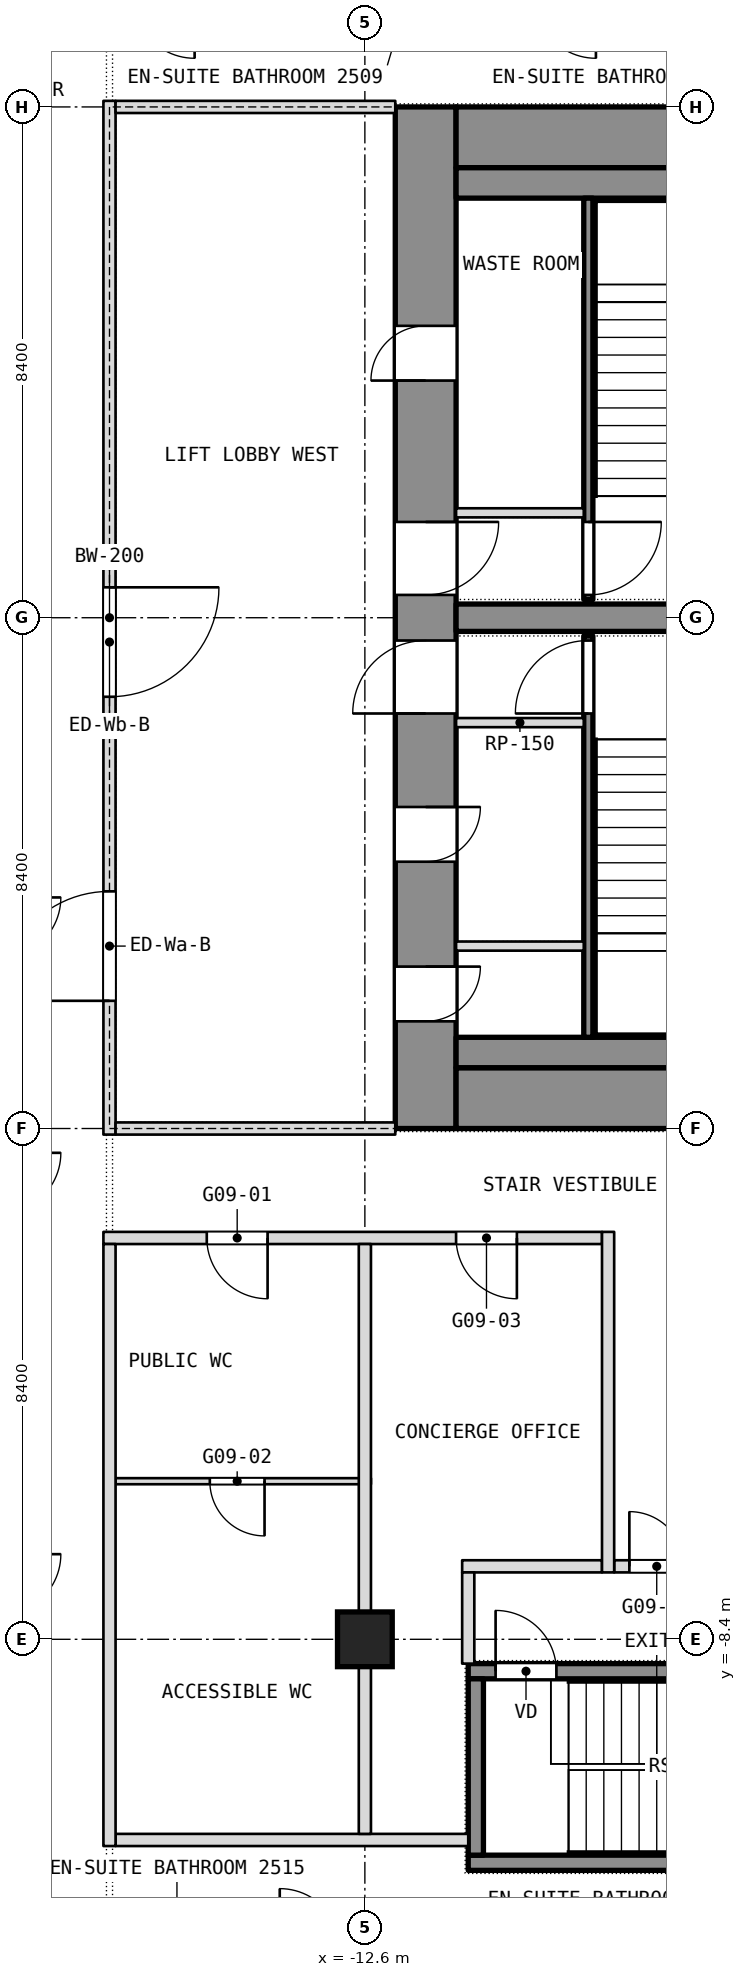
"""IFC4 building model, lengths in metres.
Left out: names, types, materials, properties, quantities, classifications, styles, units other than length and angle.
Written with IfcOpenShell. Run it as: python <this file> out.ifc"""

import sys

from ifc_helpers import new_model, si_unit, direction, frame, frame_2d, origin, origin_2d, place, context, subcontext, project, spatial, rectangle, extrude, element, fill, save


model = new_model("IFC4")
c1 = context("Model", 3, precision=1e-05, world=origin(), true_north=direction((0.0, 1.0)))
c2 = subcontext(c1, "Body", "Model", "MODEL_VIEW")
j1 = project(units=[si_unit("LENGTHUNIT", "METRE"), si_unit("PLANEANGLEUNIT", "RADIAN")], contexts=[c1])
p1 = place(None, origin())
s1 = spatial("IfcSite", under=j1, at=p1, CompositionType="ELEMENT")
p2 = place(p1, origin())
s2 = spatial("IfcBuilding", under=s1, at=p2, CompositionType="ELEMENT")
p3 = place(p2, frame((0.0, 0.0, 115.7)))
s3 = spatial("IfcBuildingStorey", under=s2, at=p3, CompositionType="ELEMENT", Elevation=115.7)
p4 = place(p3, frame((-11.6, 0.0, 0.0), z_axis=(0.0, 0.0, 1.0), x_axis=(0.0, 1.0, 0.0)))
e1 = element("IfcWall", 1, at=p4, inside=s3, PredefinedType="SHEAR", context=c2, shape_type="SweptSolid", body=[
    extrude(rectangle(XDim=16.8, YDim=1.0, at=frame_2d((8.4, 0.0))), origin(), (0.0, 0.0, 1.0), 3.6),
])
p5 = place(p4, frame((1.762, 0.0, 0.0)))
e2 = element("IfcOpeningElement", 2, at=p5, cuts=e1, PredefinedType="OPENING", context=c2, shape_type="SweptSolid", body=[
    extrude(rectangle(XDim=0.9, YDim=2.1, at=frame_2d((0.45, 1.05))), frame((0.0, 0.5, 0.0), z_axis=(0.0, -1.0, 0.0), x_axis=(1.0, 0.0, 0.0)), (0.0, 0.0, 1.0), 1.0),
])
p6 = place(p4, frame((4.387, 0.0, 0.0)))
e3 = element("IfcOpeningElement", 3, at=p6, cuts=e1, PredefinedType="OPENING", context=c2, shape_type="SweptSolid", body=[
    extrude(rectangle(XDim=0.9, YDim=2.1, at=frame_2d((0.45, 1.05))), frame((0.0, 0.5, 0.0), z_axis=(0.0, -1.0, 0.0), x_axis=(1.0, 0.0, 0.0)), (0.0, 0.0, 1.0), 1.0),
])
p7 = place(p4, frame((6.825, 0.0, 0.0)))
e4 = element("IfcOpeningElement", 4, at=p7, cuts=e1, PredefinedType="OPENING", context=c2, shape_type="SweptSolid", body=[
    extrude(rectangle(XDim=1.2, YDim=2.1, at=frame_2d((0.6, 1.05))), frame((0.0, 0.5, 0.0), z_axis=(0.0, -1.0, 0.0), x_axis=(1.0, 0.0, 0.0)), (0.0, 0.0, 1.0), 1.0),
])
p8 = place(p4, frame((12.3, 0.0, 0.0)))
e5 = element("IfcOpeningElement", 5, at=p8, cuts=e1, PredefinedType="OPENING", context=c2, shape_type="SweptSolid", body=[
    extrude(rectangle(XDim=0.9, YDim=2.1, at=frame_2d((0.45, 1.05))), frame((0.0, 0.5, 0.0), z_axis=(0.0, -1.0, 0.0), x_axis=(1.0, 0.0, 0.0)), (0.0, 0.0, 1.0), 1.0),
])
p9 = place(p4, frame((8.775, 0.0, 0.0)))
e6 = element("IfcOpeningElement", 6, at=p9, cuts=e1, PredefinedType="OPENING", context=c2, shape_type="SweptSolid", body=[
    extrude(rectangle(XDim=1.2, YDim=2.1, at=frame_2d((0.6, 1.05))), frame((0.0, 0.5, 0.0), z_axis=(0.0, -1.0, 0.0), x_axis=(1.0, 0.0, 0.0)), (0.0, 0.0, 1.0), 1.0),
])
for number, where, z_axis, x_axis in (
    (7, (-11.1, 0.5, 0.0), (0.0, 0.0, 1.0), (1.0, 0.0, 0.0)),
    (8, (-11.1, 16.3, 0.0), (0.0, 0.0, 1.0), (1.0, 0.0, 0.0)),
):
    element("IfcWall", number, at=place(p3, frame(where, z_axis=z_axis, x_axis=x_axis)), inside=s3, PredefinedType="SHEAR", context=c2, shape_type="SweptSolid", body=[
        extrude(rectangle(XDim=22.2, YDim=1.0, at=frame_2d((11.1, 0.0))), origin(), (0.0, 0.0, 1.0), 3.6),
    ])
p10 = place(p3, frame((-11.1, 8.4, 0.0), z_axis=(0.0, 0.0, 1.0), x_axis=(1.0, 0.0, 0.0)))
e9 = element("IfcWall", 9, at=p10, inside=s3, PredefinedType="SHEAR", context=c2, shape_type="SweptSolid", body=[
    extrude(rectangle(XDim=6.675, YDim=0.45, at=frame_2d((3.337, 0.0))), origin(), (0.0, 0.0, 1.0), 3.6),
])
p11 = place(p3, frame((-12.6, -8.4, 0.0), z_axis=(0.0, 0.0, 1.0), x_axis=(1.0, 0.0, 0.0)))
e10 = element("IfcColumn", 10, at=p11, inside=s3, PredefinedType="COLUMN", context=c2, shape_type="SweptSolid", body=[
    extrude(rectangle(XDim=0.9, YDim=0.9, at=origin_2d()), origin(), (0.0, 0.0, 1.0), 3.6),
])
p12 = place(p3, frame((-16.7, -11.7, 0.0), z_axis=(0.0, 0.0, 1.0), x_axis=(1.0, 0.0, 0.0)))
e11 = element("IfcWall", 11, at=p12, inside=s3, PredefinedType="PARTITIONING", context=c2, shape_type="SweptSolid", body=[
    extrude(rectangle(XDim=5.8, YDim=0.2, at=frame_2d((2.9, 0.0))), origin(), (0.0, 0.0, 1.0), 3.34),
])
p13 = place(p3, frame((-11.0, -7.2, 0.0), z_axis=(0.0, 0.0, 1.0), x_axis=(1.0, 0.0, 0.0)))
e12 = element("IfcWall", 12, at=p13, inside=s3, PredefinedType="PARTITIONING", context=c2, shape_type="SweptSolid", body=[
    extrude(rectangle(XDim=2.3, YDim=0.2, at=frame_2d((1.15, 0.0))), origin(), (0.0, 0.0, 1.0), 3.34),
])
p14 = place(p3, frame((-8.5, -7.2, 0.0), z_axis=(0.0, 0.0, 1.0), x_axis=(1.0, 0.0, 0.0)))
e13 = element("IfcWall", 13, at=p14, inside=s3, PredefinedType="PARTITIONING", context=c2, shape_type="SweptSolid", body=[
    extrude(rectangle(XDim=3.7, YDim=0.2, at=frame_2d((1.85, 0.0))), origin(), (0.0, 0.0, 1.0), 3.34),
])
p15 = place(p14, frame((0.25, 0.0, 0.0)))
e14 = element("IfcOpeningElement", 14, at=p15, cuts=e13, PredefinedType="OPENING", context=c2, shape_type="SweptSolid", body=[
    extrude(rectangle(XDim=0.9, YDim=2.1, at=frame_2d((0.45, 1.05))), frame((0.0, 0.1, 0.0), z_axis=(0.0, -1.0, 0.0), x_axis=(1.0, 0.0, 0.0)), (0.0, 0.0, 1.0), 0.2),
])
p16 = place(p3, frame((-16.7, -5.8, 0.0), z_axis=(0.0, 0.0, 1.0), x_axis=(1.0, 0.0, 0.0)))
e15 = element("IfcWall", 15, at=p16, inside=s3, PredefinedType="PARTITIONING", context=c2, shape_type="SweptSolid", body=[
    extrude(rectangle(XDim=4.2, YDim=0.1, at=frame_2d((2.1, 0.0))), origin(), (0.0, 0.0, 1.0), 3.34),
])
p17 = place(p16, frame((1.55, 0.0, 0.0)))
e16 = element("IfcOpeningElement", 16, at=p17, cuts=e15, PredefinedType="OPENING", context=c2, shape_type="SweptSolid", body=[
    extrude(rectangle(XDim=0.9, YDim=2.1, at=frame_2d((0.45, 1.05))), frame((0.0, 0.05, 0.0), z_axis=(0.0, -1.0, 0.0), x_axis=(1.0, 0.0, 0.0)), (0.0, 0.0, 1.0), 0.1),
])
p18 = place(p3, frame((-16.9, -1.8, 0.0), z_axis=(0.0, 0.0, 1.0), x_axis=(1.0, 0.0, 0.0)))
e17 = element("IfcWall", 17, at=p18, inside=s3, PredefinedType="PARTITIONING", context=c2, shape_type="SweptSolid", body=[
    extrude(rectangle(XDim=8.2, YDim=0.2, at=frame_2d((4.1, 0.0))), origin(), (0.0, 0.0, 1.0), 3.34),
])
p19 = place(p18, frame((1.7, 0.0, 0.0)))
e18 = element("IfcOpeningElement", 18, at=p19, cuts=e17, PredefinedType="OPENING", context=c2, shape_type="SweptSolid", body=[
    extrude(rectangle(XDim=1.0, YDim=2.1, at=frame_2d((0.5, 1.05))), frame((0.0, 0.1, 0.0), z_axis=(0.0, -1.0, 0.0), x_axis=(1.0, 0.0, 0.0)), (0.0, 0.0, 1.0), 0.2),
])
p20 = place(p18, frame((5.8, 0.0, 0.0)))
e19 = element("IfcOpeningElement", 19, at=p20, cuts=e17, PredefinedType="OPENING", context=c2, shape_type="SweptSolid", body=[
    extrude(rectangle(XDim=1.0, YDim=2.1, at=frame_2d((0.5, 1.05))), frame((0.0, 0.1, 0.0), z_axis=(0.0, -1.0, 0.0), x_axis=(1.0, 0.0, 0.0)), (0.0, 0.0, 1.0), 0.2),
])
p21 = place(p3, frame((-8.6, -7.3, 0.0), z_axis=(0.0, 0.0, 1.0), x_axis=(0.0, 1.0, 0.0)))
e20 = element("IfcWall", 20, at=p21, inside=s3, PredefinedType="PARTITIONING", context=c2, shape_type="SweptSolid", body=[
    extrude(rectangle(XDim=5.6, YDim=0.2, at=frame_2d((2.8, 0.0))), origin(), (0.0, 0.0, 1.0), 3.34),
])
p22 = place(p3, frame((-10.9, -8.8, 0.0), z_axis=(0.0, 0.0, 1.0), x_axis=(0.0, 1.0, 0.0)))
e21 = element("IfcWall", 21, at=p22, inside=s3, PredefinedType="PARTITIONING", context=c2, shape_type="SweptSolid", body=[
    extrude(rectangle(XDim=1.5, YDim=0.2, at=frame_2d((0.75, 0.0))), origin(), (0.0, 0.0, 1.0), 3.34),
])
p23 = place(p3, frame((-12.6, -11.6, 0.0), z_axis=(0.0, 0.0, 1.0), x_axis=(0.0, 1.0, 0.0)))
e22 = element("IfcWall", 22, at=p23, inside=s3, PredefinedType="PARTITIONING", context=c2, shape_type="SweptSolid", body=[
    extrude(rectangle(XDim=9.7, YDim=0.2, at=frame_2d((4.85, 0.0))), origin(), (0.0, 0.0, 1.0), 3.34),
])
p24 = place(p3, frame((-16.8, -11.8, 0.0), z_axis=(0.0, 0.0, 1.0), x_axis=(0.0, 1.0, 0.0)))
e23 = element("IfcWall", 23, at=p24, inside=s3, PredefinedType="PARTITIONING", context=c2, shape_type="SweptSolid", body=[
    extrude(rectangle(XDim=9.9, YDim=0.2, at=frame_2d((4.95, 0.0))), origin(), (0.0, 0.0, 1.0), 3.34),
])
for number, where, z_axis, x_axis in (
    (24, (-11.1, 1.25, 0.0), (0.0, 0.0, 1.0), (1.0, 0.0, 0.0)),
    (25, (-11.1, 15.55, 0.0), (0.0, 0.0, 1.0), (1.0, 0.0, 0.0)),
):
    element("IfcWall", number, at=place(p3, frame(where, z_axis=z_axis, x_axis=x_axis)), inside=s3, PredefinedType="PARTITIONING", context=c2, shape_type="SweptSolid", body=[
        extrude(rectangle(XDim=22.2, YDim=0.5, at=frame_2d((11.1, 0.0))), origin(), (0.0, 0.0, 1.0), 3.34),
    ])
p25 = place(p3, frame((-8.925, 1.5, 0.0), z_axis=(0.0, 0.0, 1.0), x_axis=(0.0, 1.0, 0.0)))
e26 = element("IfcWall", 26, at=p25, inside=s3, PredefinedType="SHEAR", context=c2, shape_type="SweptSolid", body=[
    extrude(rectangle(XDim=6.6, YDim=0.15, at=frame_2d((3.3, 0.0))), origin(), (0.0, 0.0, 1.0), 3.34),
])
p26 = place(p25, frame((5.325, 0.0, 0.0)))
e27 = element("IfcOpeningElement", 27, at=p26, cuts=e26, PredefinedType="OPENING", context=c2, shape_type="SweptSolid", body=[
    extrude(rectangle(XDim=1.2, YDim=2.1, at=frame_2d((0.6, 1.05))), frame((0.0, 0.075, 0.0), z_axis=(0.0, -1.0, 0.0), x_axis=(1.0, 0.0, 0.0)), (0.0, 0.0, 1.0), 0.15),
])
for number, where, z_axis, x_axis in (
    (28, (-11.1, 6.675, 0.0), (0.0, 0.0, 1.0), (1.0, 0.0, 0.0)),
    (29, (-11.1, 3.0, 0.0), (0.0, 0.0, 1.0), (1.0, 0.0, 0.0)),
):
    element("IfcWall", number, at=place(p3, frame(where, z_axis=z_axis, x_axis=x_axis)), inside=s3, PredefinedType="PARTITIONING", context=c2, shape_type="SweptSolid", body=[
        extrude(rectangle(XDim=2.1, YDim=0.15, at=frame_2d((1.05, 0.0))), origin(), (0.0, 0.0, 1.0), 3.34),
    ])
p27 = place(p3, frame((-8.925, 8.7, 0.0), z_axis=(0.0, 0.0, 1.0), x_axis=(0.0, 1.0, 0.0)))
e30 = element("IfcWall", 30, at=p27, inside=s3, PredefinedType="SHEAR", context=c2, shape_type="SweptSolid", body=[
    extrude(rectangle(XDim=6.6, YDim=0.15, at=frame_2d((3.3, 0.0))), origin(), (0.0, 0.0, 1.0), 3.34),
])
p28 = place(p27, frame((0.075, 0.0, 0.0)))
e31 = element("IfcOpeningElement", 31, at=p28, cuts=e30, PredefinedType="OPENING", context=c2, shape_type="SweptSolid", body=[
    extrude(rectangle(XDim=1.2, YDim=2.1, at=frame_2d((0.6, 1.05))), frame((0.0, 0.075, 0.0), z_axis=(0.0, -1.0, 0.0), x_axis=(1.0, 0.0, 0.0)), (0.0, 0.0, 1.0), 0.15),
])
p29 = place(p3, frame((-11.1, 10.125, 0.0), z_axis=(0.0, 0.0, 1.0), x_axis=(1.0, 0.0, 0.0)))
e32 = element("IfcWall", 32, at=p29, inside=s3, PredefinedType="PARTITIONING", context=c2, shape_type="SweptSolid", body=[
    extrude(rectangle(XDim=2.1, YDim=0.15, at=frame_2d((1.05, 0.0))), origin(), (0.0, 0.0, 1.0), 3.34),
])
p30 = place(p3, frame((-16.8, -0.1, 0.0), z_axis=(0.0, 0.0, 1.0), x_axis=(0.0, 1.0, 0.0)))
e33 = element("IfcWall", 33, at=p30, inside=s3, PredefinedType="PARTITIONING", context=c2, shape_type="SweptSolid", body=[
    extrude(rectangle(XDim=17.0, YDim=0.2, at=frame_2d((8.5, 0.0))), origin(), (0.0, 0.0, 1.0), 3.34),
])
p31 = place(p30, frame((2.2, 0.0, 0.0)))
e34 = element("IfcOpeningElement", 34, at=p31, cuts=e33, PredefinedType="OPENING", context=c2, shape_type="SweptSolid", body=[
    extrude(rectangle(XDim=1.8, YDim=2.1, at=frame_2d((0.9, 1.05))), frame((0.0, 0.1, 0.0), z_axis=(0.0, -1.0, 0.0), x_axis=(1.0, 0.0, 0.0)), (0.0, 0.0, 1.0), 0.2),
])
p32 = place(p30, frame((7.2, 0.0, 0.0)))
e35 = element("IfcOpeningElement", 35, at=p32, cuts=e33, PredefinedType="OPENING", context=c2, shape_type="SweptSolid", body=[
    extrude(rectangle(XDim=1.8, YDim=2.1, at=frame_2d((0.9, 1.05))), frame((0.0, 0.1, 0.0), z_axis=(0.0, -1.0, 0.0), x_axis=(1.0, 0.0, 0.0)), (0.0, 0.0, 1.0), 0.2),
])
for number, where, z_axis, x_axis in (
    (36, (-16.7, 0.0, 0.0), (0.0, 0.0, 1.0), (1.0, 0.0, 0.0)),
    (37, (-16.7, 16.8, 0.0), (0.0, 0.0, 1.0), (1.0, 0.0, 0.0)),
):
    element("IfcWall", number, at=place(p3, frame(where, z_axis=z_axis, x_axis=x_axis)), inside=s3, PredefinedType="PARTITIONING", context=c2, shape_type="SweptSolid", body=[
        extrude(rectangle(XDim=4.6, YDim=0.2, at=frame_2d((2.3, 0.0))), origin(), (0.0, 0.0, 1.0), 2.89),
    ])
p33 = place(p3, frame((-10.9, -12.075, 0.1), z_axis=(0.0, 0.0, 1.0), x_axis=(1.0, 0.0, 0.0)))
e38 = element("IfcWall", 38, at=p33, inside=s3, PredefinedType="SHEAR", context=c2, shape_type="SweptSolid", body=[
    extrude(rectangle(XDim=6.2, YDim=0.25, at=frame_2d((3.1, 0.0))), origin(), (0.0, 0.0, 1.0), 3.6),
])
p34 = place(p3, frame((-10.9, -8.925, 0.1), z_axis=(0.0, 0.0, 1.0), x_axis=(1.0, 0.0, 0.0)))
e39 = element("IfcWall", 39, at=p34, inside=s3, PredefinedType="SHEAR", context=c2, shape_type="SweptSolid", body=[
    extrude(rectangle(XDim=6.2, YDim=0.25, at=frame_2d((3.1, 0.0))), origin(), (0.0, 0.0, 1.0), 3.6),
])
p35 = place(p34, frame((0.45, 0.0, 0.0)))
e40 = element("IfcOpeningElement", 40, at=p35, cuts=e39, PredefinedType="OPENING", context=c2, shape_type="SweptSolid", body=[
    extrude(rectangle(XDim=1.0, YDim=2.1, at=frame_2d((0.5, 1.05))), frame((0.0, 0.125, 0.0), z_axis=(0.0, -1.0, 0.0), x_axis=(1.0, 0.0, 0.0)), (0.0, 0.0, 1.0), 0.25),
])
p36 = place(p3, frame((-10.775, -11.95, 0.1), z_axis=(0.0, 0.0, 1.0), x_axis=(0.0, 1.0, 0.0)))
e41 = element("IfcWall", 41, at=p36, inside=s3, PredefinedType="SHEAR", context=c2, shape_type="SweptSolid", body=[
    extrude(rectangle(XDim=2.9, YDim=0.25, at=frame_2d((1.45, 0.0))), origin(), (0.0, 0.0, 1.0), 3.6),
])
p37 = place(p15, origin())
e42 = element("IfcDoor", 42, at=p37, inside=s3, OperationType="SINGLE_SWING_RIGHT", PredefinedType="DOOR", context=c2, shape_type="SweptSolid", body=[
    extrude(rectangle(XDim=0.9, YDim=2.1, at=frame_2d((0.45, 1.05))), frame((0.0, 0.025, 0.0), z_axis=(0.0, -1.0, 0.0), x_axis=(1.0, 0.0, 0.0)), (0.0, 0.0, 1.0), 0.05),
])
fill(e14, e42)
p38 = place(p17, origin())
e43 = element("IfcDoor", 43, at=p38, inside=s3, OperationType="SINGLE_SWING_RIGHT", PredefinedType="DOOR", context=c2, shape_type="SweptSolid", body=[
    extrude(rectangle(XDim=0.9, YDim=2.1, at=frame_2d((0.45, 1.05))), frame((0.0, 0.025, 0.0), z_axis=(0.0, -1.0, 0.0), x_axis=(1.0, 0.0, 0.0)), (0.0, 0.0, 1.0), 0.05),
])
fill(e16, e43)
p39 = place(p19, origin())
e44 = element("IfcDoor", 44, at=p39, inside=s3, OperationType="SINGLE_SWING_LEFT", PredefinedType="DOOR", context=c2, shape_type="SweptSolid", body=[
    extrude(rectangle(XDim=1.0, YDim=2.1, at=frame_2d((0.5, 1.05))), frame((0.0, 0.025, 0.0), z_axis=(0.0, -1.0, 0.0), x_axis=(1.0, 0.0, 0.0)), (0.0, 0.0, 1.0), 0.05),
])
fill(e18, e44)
p40 = place(p20, origin())
e45 = element("IfcDoor", 45, at=p40, inside=s3, OperationType="SINGLE_SWING_LEFT", PredefinedType="DOOR", context=c2, shape_type="SweptSolid", body=[
    extrude(rectangle(XDim=1.0, YDim=2.1, at=frame_2d((0.5, 1.05))), frame((0.0, 0.025, 0.0), z_axis=(0.0, -1.0, 0.0), x_axis=(1.0, 0.0, 0.0)), (0.0, 0.0, 1.0), 0.05),
])
fill(e19, e45)
p41 = place(p35, origin())
e46 = element("IfcDoor", 46, at=p41, inside=s3, OperationType="SINGLE_SWING_LEFT", PredefinedType="DOOR", context=c2, shape_type="SweptSolid", body=[
    extrude(rectangle(XDim=1.0, YDim=2.1, at=frame_2d((0.5, 1.05))), frame((0.0, 0.025, 0.0), z_axis=(0.0, -1.0, 0.0), x_axis=(1.0, 0.0, 0.0)), (0.0, 0.0, 1.0), 0.05),
])
fill(e40, e46)
p42 = place(p5, origin())
e47 = element("IfcDoor", 47, at=p42, inside=s3, OperationType="SINGLE_SWING_LEFT", PredefinedType="DOOR", context=c2, shape_type="SweptSolid", body=[
    extrude(rectangle(XDim=0.9, YDim=2.1, at=frame_2d((0.45, 1.05))), frame((0.0, 0.025, 0.0), z_axis=(0.0, -1.0, 0.0), x_axis=(1.0, 0.0, 0.0)), (0.0, 0.0, 1.0), 0.05),
])
fill(e2, e47)
p43 = place(p6, origin())
e48 = element("IfcDoor", 48, at=p43, inside=s3, OperationType="SINGLE_SWING_LEFT", PredefinedType="DOOR", context=c2, shape_type="SweptSolid", body=[
    extrude(rectangle(XDim=0.9, YDim=2.1, at=frame_2d((0.45, 1.05))), frame((0.0, 0.025, 0.0), z_axis=(0.0, -1.0, 0.0), x_axis=(1.0, 0.0, 0.0)), (0.0, 0.0, 1.0), 0.05),
])
fill(e3, e48)
p44 = place(p7, origin())
e49 = element("IfcDoor", 49, at=p44, inside=s3, OperationType="SINGLE_SWING_LEFT", PredefinedType="DOOR", context=c2, shape_type="SweptSolid", body=[
    extrude(rectangle(XDim=1.2, YDim=2.1, at=frame_2d((0.6, 1.05))), frame((0.0, 0.025, 0.0), z_axis=(0.0, -1.0, 0.0), x_axis=(1.0, 0.0, 0.0)), (0.0, 0.0, 1.0), 0.05),
])
fill(e4, e49)
p45 = place(p26, origin())
e50 = element("IfcDoor", 50, at=p45, inside=s3, OperationType="SINGLE_SWING_LEFT", PredefinedType="DOOR", context=c2, shape_type="SweptSolid", body=[
    extrude(rectangle(XDim=1.2, YDim=2.1, at=frame_2d((0.6, 1.05))), frame((0.0, 0.025, 0.0), z_axis=(0.0, -1.0, 0.0), x_axis=(1.0, 0.0, 0.0)), (0.0, 0.0, 1.0), 0.05),
])
fill(e27, e50)
p46 = place(p8, origin())
e51 = element("IfcDoor", 51, at=p46, inside=s3, OperationType="SINGLE_SWING_LEFT", PredefinedType="DOOR", context=c2, shape_type="SweptSolid", body=[
    extrude(rectangle(XDim=0.9, YDim=2.1, at=frame_2d((0.45, 1.05))), frame((0.0, 0.025, 0.0), z_axis=(0.0, -1.0, 0.0), x_axis=(1.0, 0.0, 0.0)), (0.0, 0.0, 1.0), 0.05),
])
fill(e5, e51)
p47 = place(p9, origin())
e52 = element("IfcDoor", 52, at=p47, inside=s3, OperationType="SINGLE_SWING_LEFT", PredefinedType="DOOR", context=c2, shape_type="SweptSolid", body=[
    extrude(rectangle(XDim=1.2, YDim=2.1, at=frame_2d((0.6, 1.05))), frame((0.0, 0.025, 0.0), z_axis=(0.0, -1.0, 0.0), x_axis=(1.0, 0.0, 0.0)), (0.0, 0.0, 1.0), 0.05),
])
fill(e6, e52)
p48 = place(p28, origin())
e53 = element("IfcDoor", 53, at=p48, inside=s3, OperationType="SINGLE_SWING_LEFT", PredefinedType="DOOR", context=c2, shape_type="SweptSolid", body=[
    extrude(rectangle(XDim=1.2, YDim=2.1, at=frame_2d((0.6, 1.05))), frame((0.0, 0.025, 0.0), z_axis=(0.0, -1.0, 0.0), x_axis=(1.0, 0.0, 0.0)), (0.0, 0.0, 1.0), 0.05),
])
fill(e31, e53)
p49 = place(p31, origin())
e54 = element("IfcDoor", 54, at=p49, inside=s3, OperationType="DOUBLE_DOOR_SINGLE_SWING", PredefinedType="DOOR", context=c2, shape_type="SweptSolid", body=[
    extrude(rectangle(XDim=1.8, YDim=2.1, at=frame_2d((0.9, 1.05))), frame((0.0, 0.025, 0.0), z_axis=(0.0, -1.0, 0.0), x_axis=(1.0, 0.0, 0.0)), (0.0, 0.0, 1.0), 0.05),
])
fill(e34, e54)
p50 = place(p32, origin())
e55 = element("IfcDoor", 55, at=p50, inside=s3, OperationType="DOUBLE_DOOR_SINGLE_SWING", PredefinedType="DOOR", context=c2, shape_type="SweptSolid", body=[
    extrude(rectangle(XDim=1.8, YDim=2.1, at=frame_2d((0.9, 1.05))), frame((0.0, 0.025, 0.0), z_axis=(0.0, -1.0, 0.0), x_axis=(1.0, 0.0, 0.0)), (0.0, 0.0, 1.0), 0.05),
])
fill(e35, e55)
save(model, sys.argv[1])
